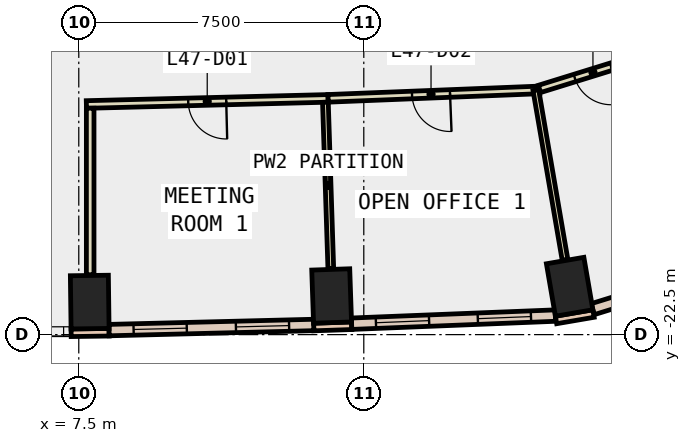
"""IFC4 building model, lengths in metres.
Left out: names, types, materials, properties, quantities, classifications, styles, units other than length and angle.
Written with IfcOpenShell. Run it as: python <this file> out.ifc"""

import sys

from ifc_helpers import new_model, si_unit, direction, frame, frame_2d, origin, origin_2d, place, context, subcontext, project, spatial, rectangle, extrude, element, fill, save


model = new_model("IFC4")
c1 = context("Model", 3, precision=1e-05, world=origin(), true_north=direction((0.0, 1.0)))
c2 = subcontext(c1, "Body", "Model", "MODEL_VIEW")
j1 = project(units=[si_unit("LENGTHUNIT", "METRE"), si_unit("PLANEANGLEUNIT", "RADIAN")], contexts=[c1])
p1 = place(None, origin())
s1 = spatial("IfcSite", under=j1, at=p1, CompositionType="ELEMENT")
p2 = place(p1, origin())
s2 = spatial("IfcBuilding", under=s1, at=p2, CompositionType="ELEMENT")
p3 = place(p2, frame((0.0, 0.0, 210.8)))
s3 = spatial("IfcBuildingStorey", under=s2, at=p3, CompositionType="ELEMENT", Elevation=210.8)
for number, where, z_axis, x_axis in (
    (1, (7.788, -21.644, -0.4), (0.0, 0.0, 1.0), (1.0, 0.013, 0.0)),
    (2, (14.154, -21.484, -0.4), (0.0, 0.0, 1.0), (0.999, 0.034, 0.0)),
    (3, (20.417, -21.241, -0.4), (0.0, 0.0, 1.0), (0.986, 0.169, 0.0)),
):
    element("IfcColumn", number, at=place(p3, frame(where, z_axis=z_axis, x_axis=x_axis)), inside=s3, PredefinedType="COLUMN", context=c2, shape_type="SweptSolid", body=[
        extrude(rectangle(XDim=1.0, YDim=1.4, at=origin_2d()), origin(), (0.0, 0.0, 1.0), 4.2),
    ])
p4 = place(p3, frame((7.299, -22.451, 0.0), z_axis=(0.0, 0.0, 1.0), x_axis=(0.999903186316, 0.013914668364, 0.0)))
e4 = element("IfcWall", 4, at=p4, inside=s3, PredefinedType="STANDARD", context=c2, shape_type="SweptSolid", body=[
    extrude(rectangle(XDim=1.0, YDim=0.2, at=frame_2d((0.5, 0.0))), origin(), (0.0, 0.0, 1.0), 3.8),
])
p5 = place(p3, frame((13.682, -22.3, 0.0), z_axis=(0.0, 0.0, 1.0), x_axis=(0.999423561854, 0.033949138587, 0.0)))
e5 = element("IfcWall", 5, at=p5, inside=s3, PredefinedType="STANDARD", context=c2, shape_type="SweptSolid", body=[
    extrude(rectangle(XDim=1.0, YDim=0.2, at=frame_2d((0.5, 0.0))), origin(), (0.0, 0.0, 1.0), 3.8),
])
p6 = place(p3, frame((20.059, -22.114, 0.0), z_axis=(0.0, 0.0, 1.0), x_axis=(0.985631544579, 0.168909615862, 0.0)))
e6 = element("IfcWall", 6, at=p6, inside=s3, PredefinedType="STANDARD", context=c2, shape_type="SweptSolid", body=[
    extrude(rectangle(XDim=1.0, YDim=0.2, at=frame_2d((0.5, 0.0))), origin(), (0.0, 0.0, 1.0), 3.8),
])
p7 = place(p3, frame((8.297, -22.381, 0.0), z_axis=(0.0, 0.0, 1.0), x_axis=(0.999685717988, 0.025069209235, 0.0)))
e7 = element("IfcWall", 7, at=p7, inside=s3, PredefinedType="STANDARD", context=c2, shape_type="SweptSolid", body=[
    extrude(rectangle(XDim=5.385, YDim=0.3, at=frame_2d((2.693, 0.0))), origin(), (0.0, 0.0, 1.0), 3.8),
])
p8 = place(p7, frame((0.646, 0.0, 0.9)))
e8 = element("IfcOpeningElement", 8, at=p8, cuts=e7, PredefinedType="OPENING", context=c2, shape_type="SweptSolid", body=[
    extrude(rectangle(XDim=1.4, YDim=2.6, at=frame_2d((0.7, 1.3))), frame((0.0, 0.16, 0.0), z_axis=(0.0, -1.0, 0.0), x_axis=(1.0, 0.0, 0.0)), (0.0, 0.0, 1.0), 0.32),
])
p9 = place(p7, frame((3.339, 0.0, 0.9)))
e9 = element("IfcOpeningElement", 9, at=p9, cuts=e7, PredefinedType="OPENING", context=c2, shape_type="SweptSolid", body=[
    extrude(rectangle(XDim=1.4, YDim=2.6, at=frame_2d((0.7, 1.3))), frame((0.0, 0.16, 0.0), z_axis=(0.0, -1.0, 0.0), x_axis=(1.0, 0.0, 0.0)), (0.0, 0.0, 1.0), 0.32),
])
p10 = place(p3, frame((14.679, -22.213, 0.0), z_axis=(0.0, 0.0, 1.0), x_axis=(0.999205241612, 0.039860822062, 0.0)))
e10 = element("IfcWall", 10, at=p10, inside=s3, PredefinedType="STANDARD", context=c2, shape_type="SweptSolid", body=[
    extrude(rectangle(XDim=5.365, YDim=0.3, at=frame_2d((2.683, 0.0))), origin(), (0.0, 0.0, 1.0), 3.8),
])
p11 = place(p10, frame((0.641, 0.0, 0.9)))
e11 = element("IfcOpeningElement", 11, at=p11, cuts=e10, PredefinedType="OPENING", context=c2, shape_type="SweptSolid", body=[
    extrude(rectangle(XDim=1.4, YDim=2.6, at=frame_2d((0.7, 1.3))), frame((0.0, 0.16, 0.0), z_axis=(0.0, -1.0, 0.0), x_axis=(1.0, 0.0, 0.0)), (0.0, 0.0, 1.0), 0.32),
])
p12 = place(p10, frame((3.324, 0.0, 0.9)))
e12 = element("IfcOpeningElement", 12, at=p12, cuts=e10, PredefinedType="OPENING", context=c2, shape_type="SweptSolid", body=[
    extrude(rectangle(XDim=1.4, YDim=2.6, at=frame_2d((0.7, 1.3))), frame((0.0, 0.16, 0.0), z_axis=(0.0, -1.0, 0.0), x_axis=(1.0, 0.0, 0.0)), (0.0, 0.0, 1.0), 0.32),
])
p13 = place(p3, frame((21.024, -21.83, 0.0), z_axis=(0.0, 0.0, 1.0), x_axis=(0.955247215067, 0.295808651171, 0.0)))
e13 = element("IfcWall", 13, at=p13, inside=s3, PredefinedType="STANDARD", context=c2, shape_type="SweptSolid", body=[
    extrude(rectangle(XDim=4.161, YDim=0.3, at=frame_2d((2.081, 0.0))), origin(), (0.0, 0.0, 1.0), 3.8),
])
p14 = place(p13, frame((1.381, 0.0, 0.9)))
e14 = element("IfcOpeningElement", 14, at=p14, cuts=e13, PredefinedType="OPENING", context=c2, shape_type="SweptSolid", body=[
    extrude(rectangle(XDim=1.4, YDim=2.6, at=frame_2d((0.7, 1.3))), frame((0.0, 0.16, 0.0), z_axis=(0.0, -1.0, 0.0), x_axis=(1.0, 0.0, 0.0)), (0.0, 0.0, 1.0), 0.32),
])
p15 = place(p3, frame((14.061, -16.284, 0.0), z_axis=(0.0, 0.0, 1.0), x_axis=(-0.999679323762, -0.025322907453, 0.0)))
e15 = element("IfcWall", 15, at=p15, inside=s3, PredefinedType="PARTITIONING", context=c2, shape_type="SweptSolid", body=[
    extrude(rectangle(XDim=6.363, YDim=0.2, at=frame_2d((3.182, 0.0))), origin(), (0.0, 0.0, 1.0), 3.8),
])
p16 = place(p15, frame((2.682, 0.0, 0.0)))
e16 = element("IfcOpeningElement", 16, at=p16, cuts=e15, PredefinedType="OPENING", context=c2, shape_type="SweptSolid", body=[
    extrude(rectangle(XDim=1.0, YDim=2.1, at=frame_2d((0.5, 1.05))), frame((0.0, 0.11, 0.0), z_axis=(0.0, -1.0, 0.0), x_axis=(1.0, 0.0, 0.0)), (0.0, 0.0, 1.0), 0.22),
])
p17 = place(p3, frame((19.627, -16.061, 0.0), z_axis=(0.0, 0.0, 1.0), x_axis=(-0.999206061563, -0.039840262741, 0.0)))
e17 = element("IfcWall", 17, at=p17, inside=s3, PredefinedType="PARTITIONING", context=c2, shape_type="SweptSolid", body=[
    extrude(rectangle(XDim=5.57, YDim=0.2, at=frame_2d((2.785, 0.0))), origin(), (0.0, 0.0, 1.0), 3.8),
])
p18 = place(p17, frame((2.36, 0.0, 0.0)))
e18 = element("IfcOpeningElement", 18, at=p18, cuts=e17, PredefinedType="OPENING", context=c2, shape_type="SweptSolid", body=[
    extrude(rectangle(XDim=1.0, YDim=2.1, at=frame_2d((0.5, 1.05))), frame((0.0, 0.11, 0.0), z_axis=(0.0, -1.0, 0.0), x_axis=(1.0, 0.0, 0.0)), (0.0, 0.0, 1.0), 0.22),
])
p19 = place(p3, frame((22.438, -15.163, 0.0), z_axis=(0.0, 0.0, 1.0), x_axis=(-0.955234616163, -0.295849333419, 0.0)))
e19 = element("IfcWall", 19, at=p19, inside=s3, PredefinedType="PARTITIONING", context=c2, shape_type="SweptSolid", body=[
    extrude(rectangle(XDim=2.947, YDim=0.2, at=frame_2d((1.473, 0.0))), origin(), (0.0, 0.0, 1.0), 3.8),
])
p20 = place(p19, frame((0.974, 0.0, 0.0)))
e20 = element("IfcOpeningElement", 20, at=p20, cuts=e19, PredefinedType="OPENING", context=c2, shape_type="SweptSolid", body=[
    extrude(rectangle(XDim=1.0, YDim=2.1, at=frame_2d((0.5, 1.05))), frame((0.0, 0.11, 0.0), z_axis=(0.0, -1.0, 0.0), x_axis=(1.0, 0.0, 0.0)), (0.0, 0.0, 1.0), 0.22),
])
p21 = place(p3, frame((7.8, -16.542, 0.0), z_axis=(0.0, 0.0, 1.0), x_axis=(0.0, -1.0, 0.0)))
e21 = element("IfcWall", 21, at=p21, inside=s3, PredefinedType="PARTITIONING", context=c2, shape_type="SweptSolid", body=[
    extrude(rectangle(XDim=4.382, YDim=0.2, at=frame_2d((2.191, 0.0))), origin(), (0.0, 0.0, 1.0), 3.8),
])
p22 = place(p3, frame((13.99, -16.386, 0.0), z_axis=(0.0, 0.0, 1.0), x_axis=(0.032438863816, -0.999473721573, 0.0)))
e22 = element("IfcWall", 22, at=p22, inside=s3, PredefinedType="PARTITIONING", context=c2, shape_type="SweptSolid", body=[
    extrude(rectangle(XDim=4.38, YDim=0.15, at=frame_2d((2.19, 0.0))), origin(), (0.0, 0.0, 1.0), 3.8),
])
p23 = place(p3, frame((19.527, -16.065, 0.0), z_axis=(0.0, 0.0, 1.0), x_axis=(0.169437821314, -0.985540879268, 0.0)))
e23 = element("IfcWall", 23, at=p23, inside=s3, PredefinedType="PARTITIONING", context=c2, shape_type="SweptSolid", body=[
    extrude(rectangle(XDim=4.531, YDim=0.15, at=frame_2d((2.266, 0.0))), origin(), (0.0, 0.0, 1.0), 3.8),
])
p24 = place(p8, origin())
e24 = element("IfcWindow", 24, at=p24, inside=s3, PartitioningType="SINGLE_PANEL", PredefinedType="WINDOW", context=c2, shape_type="SweptSolid", body=[
    extrude(rectangle(XDim=1.4, YDim=2.6, at=frame_2d((0.7, 1.3))), frame((0.0, 0.03, 0.0), z_axis=(0.0, -1.0, 0.0), x_axis=(1.0, 0.0, 0.0)), (0.0, 0.0, 1.0), 0.06),
])
fill(e8, e24)
p25 = place(p9, origin())
e25 = element("IfcWindow", 25, at=p25, inside=s3, PartitioningType="SINGLE_PANEL", PredefinedType="WINDOW", context=c2, shape_type="SweptSolid", body=[
    extrude(rectangle(XDim=1.4, YDim=2.6, at=frame_2d((0.7, 1.3))), frame((0.0, 0.03, 0.0), z_axis=(0.0, -1.0, 0.0), x_axis=(1.0, 0.0, 0.0)), (0.0, 0.0, 1.0), 0.06),
])
fill(e9, e25)
p26 = place(p11, origin())
e26 = element("IfcWindow", 26, at=p26, inside=s3, PartitioningType="SINGLE_PANEL", PredefinedType="WINDOW", context=c2, shape_type="SweptSolid", body=[
    extrude(rectangle(XDim=1.4, YDim=2.6, at=frame_2d((0.7, 1.3))), frame((0.0, 0.03, 0.0), z_axis=(0.0, -1.0, 0.0), x_axis=(1.0, 0.0, 0.0)), (0.0, 0.0, 1.0), 0.06),
])
fill(e11, e26)
p27 = place(p12, origin())
e27 = element("IfcWindow", 27, at=p27, inside=s3, PartitioningType="SINGLE_PANEL", PredefinedType="WINDOW", context=c2, shape_type="SweptSolid", body=[
    extrude(rectangle(XDim=1.4, YDim=2.6, at=frame_2d((0.7, 1.3))), frame((0.0, 0.03, 0.0), z_axis=(0.0, -1.0, 0.0), x_axis=(1.0, 0.0, 0.0)), (0.0, 0.0, 1.0), 0.06),
])
fill(e12, e27)
p28 = place(p16, origin())
e28 = element("IfcDoor", 28, at=p28, inside=s3, OperationType="SINGLE_SWING_LEFT", PredefinedType="DOOR", context=c2, shape_type="SweptSolid", body=[
    extrude(rectangle(XDim=1.0, YDim=2.1, at=frame_2d((0.5, 1.05))), frame((0.0, 0.025, 0.0), z_axis=(0.0, -1.0, 0.0), x_axis=(1.0, 0.0, 0.0)), (0.0, 0.0, 1.0), 0.05),
])
fill(e16, e28)
p29 = place(p18, origin())
e29 = element("IfcDoor", 29, at=p29, inside=s3, OperationType="SINGLE_SWING_LEFT", PredefinedType="DOOR", context=c2, shape_type="SweptSolid", body=[
    extrude(rectangle(XDim=1.0, YDim=2.1, at=frame_2d((0.5, 1.05))), frame((0.0, 0.025, 0.0), z_axis=(0.0, -1.0, 0.0), x_axis=(1.0, 0.0, 0.0)), (0.0, 0.0, 1.0), 0.05),
])
fill(e18, e29)
p30 = place(p20, origin())
e30 = element("IfcDoor", 30, at=p30, inside=s3, OperationType="SINGLE_SWING_LEFT", PredefinedType="DOOR", context=c2, shape_type="SweptSolid", body=[
    extrude(rectangle(XDim=1.0, YDim=2.1, at=frame_2d((0.5, 1.05))), frame((0.0, 0.025, 0.0), z_axis=(0.0, -1.0, 0.0), x_axis=(1.0, 0.0, 0.0)), (0.0, 0.0, 1.0), 0.05),
])
fill(e20, e30)
save(model, sys.argv[1])
